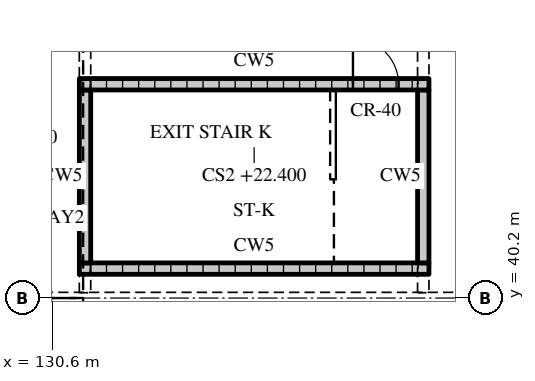
"""IFC4 building model, lengths in metres.
Left out: names, types, materials, properties, quantities, classifications, styles, units other than length and angle.
Written with IfcOpenShell. Run it as: python <this file> out.ifc"""

import sys

from ifc_helpers import new_model, si_unit, direction, frame, frame_2d, origin, place, context, subcontext, project, spatial, rectangle, extrude, element, fill, save


model = new_model("IFC4")
c1 = context("Model", 3, precision=1e-05, world=origin(), true_north=direction((0.0, 1.0)))
c2 = subcontext(c1, "Body", "Model", "MODEL_VIEW")
j1 = project(units=[si_unit("LENGTHUNIT", "METRE"), si_unit("PLANEANGLEUNIT", "RADIAN")], contexts=[c1])
p1 = place(None, origin())
s1 = spatial("IfcSite", under=j1, at=p1, CompositionType="ELEMENT")
p2 = place(p1, origin())
s2 = spatial("IfcBuilding", under=s1, at=p2, CompositionType="ELEMENT")
p3 = place(p2, frame((0.0, 0.0, 19.2)))
s3 = spatial("IfcBuildingStorey", under=s2, at=p3, CompositionType="ELEMENT", Elevation=19.2)
p4 = place(p3, frame((131.3, 40.975, 0.0), z_axis=(0.0, 0.0, 1.0), x_axis=(1.0, 0.0, 0.0)))
e1 = element("IfcWall", 1, at=p4, inside=s3, PredefinedType="SOLIDWALL", context=c2, shape_type="SweptSolid", body=[
    extrude(rectangle(XDim=9.2, YDim=0.3, at=frame_2d((4.6, 0.0))), origin(), (0.0, 0.0, 1.0), 3.0),
])
for number, where, z_axis, x_axis in (
    (2, (131.45, 41.125, 0.0), (0.0, 0.0, 1.0), (0.0, 1.0, 0.0)),
    (3, (140.35, 41.125, 0.0), (0.0, 0.0, 1.0), (0.0, 1.0, 0.0)),
):
    element("IfcWall", number, at=place(p3, frame(where, z_axis=z_axis, x_axis=x_axis)), inside=s3, PredefinedType="SOLIDWALL", context=c2, shape_type="SweptSolid", body=[
        extrude(rectangle(XDim=4.55, YDim=0.3, at=frame_2d((2.275, 0.0))), origin(), (0.0, 0.0, 1.0), 3.0),
    ])
p5 = place(p3, frame((131.3, 45.825, 0.0), z_axis=(0.0, 0.0, 1.0), x_axis=(1.0, 0.0, 0.0)))
e4 = element("IfcWall", 4, at=p5, inside=s3, PredefinedType="SOLIDWALL", context=c2, shape_type="SweptSolid", body=[
    extrude(rectangle(XDim=9.2, YDim=0.3, at=frame_2d((4.6, 0.0))), origin(), (0.0, 0.0, 1.0), 3.0),
])
p6 = place(p5, frame((7.2, 0.0, 0.0)))
e5 = element("IfcOpeningElement", 5, at=p6, cuts=e4, PredefinedType="OPENING", context=c2, shape_type="SweptSolid", body=[
    extrude(rectangle(XDim=1.2, YDim=2.1, at=frame_2d((0.6, 1.05))), frame((0.0, 0.16, 0.0), z_axis=(0.0, -1.0, 0.0), x_axis=(1.0, 0.0, 0.0)), (0.0, 0.0, 1.0), 0.32),
])
p7 = place(p6, origin())
e6 = element("IfcDoor", 6, at=p7, inside=s3, OperationType="SINGLE_SWING_LEFT", PredefinedType="DOOR", context=c2, shape_type="SweptSolid", body=[
    extrude(rectangle(XDim=1.2, YDim=2.1, at=frame_2d((0.6, 1.05))), frame((0.0, 0.025, 0.0), z_axis=(0.0, -1.0, 0.0), x_axis=(1.0, 0.0, 0.0)), (0.0, 0.0, 1.0), 0.05),
])
fill(e5, e6)
save(model, sys.argv[1])
